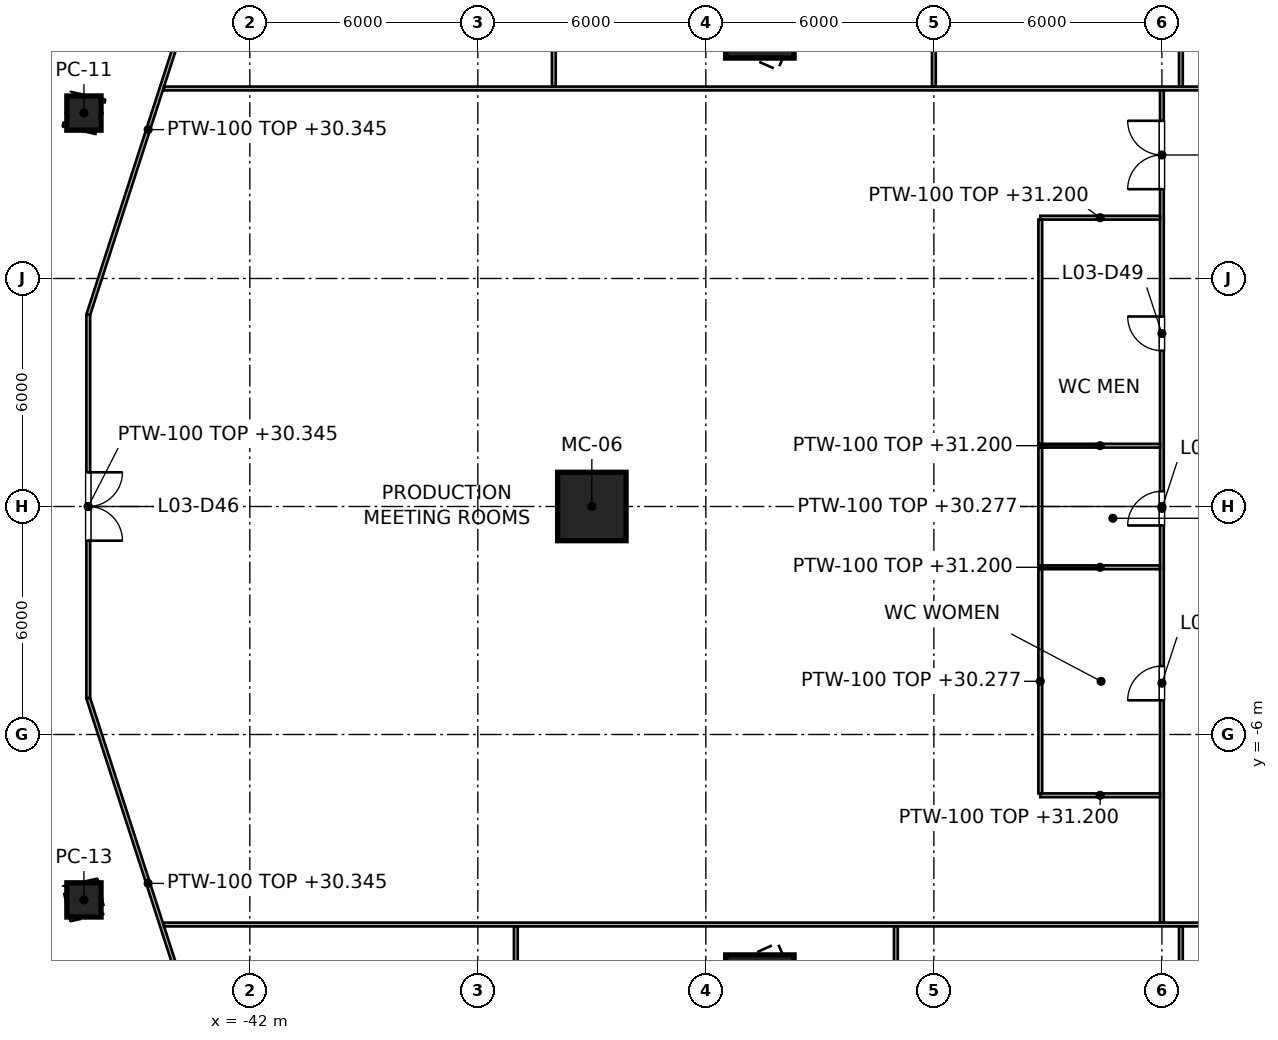
"""IFC4 building model, lengths in metres.
Left out: names, types, materials, properties, quantities, classifications, styles, units other than length and angle.
Written with IfcOpenShell. Run it as: python <this file> out.ifc"""

import sys

from ifc_helpers import new_model, si_unit, direction, frame, frame_2d, origin, origin_2d, place, context, subcontext, project, spatial, rectangle, hollow_rectangle, extrude, element, fill, save


model = new_model("IFC4")
c1 = context("Model", 3, precision=1e-05, world=origin(), true_north=direction((0.0, 1.0)))
c2 = subcontext(c1, "Body", "Model", "MODEL_VIEW")
j1 = project(units=[si_unit("LENGTHUNIT", "METRE"), si_unit("PLANEANGLEUNIT", "RADIAN")], contexts=[c1])
p1 = place(None, origin())
s1 = spatial("IfcSite", under=j1, at=p1, CompositionType="ELEMENT")
p2 = place(p1, origin())
s2 = spatial("IfcBuilding", under=s1, at=p2, CompositionType="ELEMENT")
p3 = place(p2, frame((0.0, 0.0, 26.0)))
s3 = spatial("IfcBuildingStorey", under=s2, at=p3, CompositionType="ELEMENT", Elevation=26.0)
for number, where, z_axis, x_axis in (
    (1, (-28.579, 12.7, 0.0), (0.0, 0.0, 1.0), (-0.914, 0.406, 0.0)),
    (2, (-33.0, 0.0, 0.0), (0.0, 0.0, 1.0), (-1.0, 0.0, 0.0)),
    (3, (-28.579, -12.7, 0.0), (0.0, 0.0, 1.0), (-0.914, -0.406, 0.0)),
):
    element("IfcColumn", number, at=place(p3, frame(where, z_axis=z_axis, x_axis=x_axis)), inside=s3, PredefinedType="COLUMN", context=c2, shape_type="SweptSolid", body=[
        extrude(hollow_rectangle(XDim=1.8, YDim=1.8, WallThickness=0.08, at=origin_2d()), origin(), (0.0, 0.0, 1.0), 5.4),
    ])
for number, where, z_axis, x_axis in (
    (4, (-46.365, 10.353, 0.0), (0.0, 0.0, 1.0), (-0.976, 0.218, 0.0)),
    (5, (-46.365, -10.353, 0.0), (0.0, 0.0, 1.0), (-0.976, -0.218, 0.0)),
):
    element("IfcColumn", number, at=place(p3, frame(where, z_axis=z_axis, x_axis=x_axis)), inside=s3, PredefinedType="COLUMN", context=c2, shape_type="SweptSolid", body=[
        extrude(hollow_rectangle(XDim=0.9, YDim=0.9, WallThickness=0.04, at=origin_2d()), origin(), (0.0, 0.0, 1.0), 5.4),
    ])
p4 = place(p3, frame((-43.099, 14.791, 0.0), z_axis=(0.0, 0.0, 1.0), x_axis=(-0.307713034182, -0.951479210805, 0.0)))
e6 = element("IfcWall", 6, at=p4, inside=s3, PredefinedType="PARTITIONING", context=c2, shape_type="SweptSolid", body=[
    extrude(rectangle(XDim=10.243, YDim=0.1, at=frame_2d((5.122, 0.0))), origin(), (0.0, 0.0, 1.0), 4.345),
])
p5 = place(p3, frame((-46.251, 5.045, 0.0), z_axis=(0.0, 0.0, 1.0), x_axis=(0.0, -1.0, 0.0)))
e7 = element("IfcWall", 7, at=p5, inside=s3, PredefinedType="PARTITIONING", context=c2, shape_type="SweptSolid", body=[
    extrude(rectangle(XDim=10.09, YDim=0.1, at=frame_2d((5.045, 0.0))), origin(), (0.0, 0.0, 1.0), 4.345),
])
p6 = place(p5, frame((4.145, 0.0, 0.0)))
e8 = element("IfcOpeningElement", 8, at=p6, cuts=e7, PredefinedType="OPENING", context=c2, shape_type="SweptSolid", body=[
    extrude(rectangle(XDim=1.8, YDim=2.1, at=frame_2d((0.9, 1.05))), frame((0.0, 0.05, 0.0), z_axis=(0.0, -1.0, 0.0), x_axis=(1.0, 0.0, 0.0)), (0.0, 0.0, 1.0), 0.1),
])
p7 = place(p3, frame((-46.251, -5.045, 0.0), z_axis=(0.0, 0.0, 1.0), x_axis=(0.307713034182, -0.951479210805, 0.0)))
e9 = element("IfcWall", 9, at=p7, inside=s3, PredefinedType="PARTITIONING", context=c2, shape_type="SweptSolid", body=[
    extrude(rectangle(XDim=10.243, YDim=0.1, at=frame_2d((5.122, 0.0))), origin(), (0.0, 0.0, 1.0), 4.345),
])
p8 = place(p3, frame((-44.256, 11.0, 0.0), z_axis=(0.0, 0.0, 1.0), x_axis=(1.0, 0.0, 0.0)))
e10 = element("IfcWall", 10, at=p8, inside=s3, PredefinedType="PARTITIONING", context=c2, shape_type="SweptSolid", body=[
    extrude(rectangle(XDim=88.512, YDim=0.1, at=frame_2d((44.256, 0.0))), origin(), (0.0, 0.0, 1.0), 4.268),
])
p9 = place(p8, frame((54.2, 0.0, 0.0)))
e11 = element("IfcOpeningElement", 11, at=p9, cuts=e10, PredefinedType="OPENING", context=c2, shape_type="SweptSolid", body=[
    extrude(rectangle(XDim=1.4, YDim=2.1, at=frame_2d((0.7, 1.05))), frame((0.0, 0.05, 0.0), z_axis=(0.0, -1.0, 0.0), x_axis=(1.0, 0.0, 0.0)), (0.0, 0.0, 1.0), 0.1),
])
p10 = place(p8, frame((32.9, 0.0, 0.0)))
e12 = element("IfcOpeningElement", 12, at=p10, cuts=e10, PredefinedType="OPENING", context=c2, shape_type="SweptSolid", body=[
    extrude(rectangle(XDim=1.4, YDim=2.1, at=frame_2d((0.7, 1.05))), frame((0.0, 0.05, 0.0), z_axis=(0.0, -1.0, 0.0), x_axis=(1.0, 0.0, 0.0)), (0.0, 0.0, 1.0), 0.1),
])
p11 = place(p8, frame((29.15, 0.0, 0.0)))
e13 = element("IfcOpeningElement", 13, at=p11, cuts=e10, PredefinedType="OPENING", context=c2, shape_type="SweptSolid", body=[
    extrude(rectangle(XDim=0.9, YDim=2.1, at=frame_2d((0.45, 1.05))), frame((0.0, 0.05, 0.0), z_axis=(0.0, -1.0, 0.0), x_axis=(1.0, 0.0, 0.0)), (0.0, 0.0, 1.0), 0.1),
])
p12 = place(p8, frame((46.55, 0.0, 0.0)))
e14 = element("IfcOpeningElement", 14, at=p12, cuts=e10, PredefinedType="OPENING", context=c2, shape_type="SweptSolid", body=[
    extrude(rectangle(XDim=0.9, YDim=2.1, at=frame_2d((0.45, 1.05))), frame((0.0, 0.05, 0.0), z_axis=(0.0, -1.0, 0.0), x_axis=(1.0, 0.0, 0.0)), (0.0, 0.0, 1.0), 0.1),
])
p13 = place(p8, frame((60.85, 0.0, 0.0)))
e15 = element("IfcOpeningElement", 15, at=p13, cuts=e10, PredefinedType="OPENING", context=c2, shape_type="SweptSolid", body=[
    extrude(rectangle(XDim=0.9, YDim=2.1, at=frame_2d((0.45, 1.05))), frame((0.0, 0.05, 0.0), z_axis=(0.0, -1.0, 0.0), x_axis=(1.0, 0.0, 0.0)), (0.0, 0.0, 1.0), 0.1),
])
p14 = place(p3, frame((-44.256, -11.0, 0.0), z_axis=(0.0, 0.0, 1.0), x_axis=(1.0, 0.0, 0.0)))
e16 = element("IfcWall", 16, at=p14, inside=s3, PredefinedType="PARTITIONING", context=c2, shape_type="SweptSolid", body=[
    extrude(rectangle(XDim=88.512, YDim=0.1, at=frame_2d((44.256, 0.0))), origin(), (0.0, 0.0, 1.0), 4.268),
])
p15 = place(p14, frame((32.9, 0.0, 0.0)))
e17 = element("IfcOpeningElement", 17, at=p15, cuts=e16, PredefinedType="OPENING", context=c2, shape_type="SweptSolid", body=[
    extrude(rectangle(XDim=1.4, YDim=2.1, at=frame_2d((0.7, 1.05))), frame((0.0, 0.05, 0.0), z_axis=(0.0, -1.0, 0.0), x_axis=(1.0, 0.0, 0.0)), (0.0, 0.0, 1.0), 0.1),
])
p16 = place(p14, frame((54.2, 0.0, 0.0)))
e18 = element("IfcOpeningElement", 18, at=p16, cuts=e16, PredefinedType="OPENING", context=c2, shape_type="SweptSolid", body=[
    extrude(rectangle(XDim=1.4, YDim=2.1, at=frame_2d((0.7, 1.05))), frame((0.0, 0.05, 0.0), z_axis=(0.0, -1.0, 0.0), x_axis=(1.0, 0.0, 0.0)), (0.0, 0.0, 1.0), 0.1),
])
p17 = place(p14, frame((37.85, 0.0, 0.0)))
e19 = element("IfcOpeningElement", 19, at=p17, cuts=e16, PredefinedType="OPENING", context=c2, shape_type="SweptSolid", body=[
    extrude(rectangle(XDim=0.9, YDim=2.1, at=frame_2d((0.45, 1.05))), frame((0.0, 0.05, 0.0), z_axis=(0.0, -1.0, 0.0), x_axis=(1.0, 0.0, 0.0)), (0.0, 0.0, 1.0), 0.1),
])
p18 = place(p14, frame((47.3, 0.0, 0.0)))
e20 = element("IfcOpeningElement", 20, at=p18, cuts=e16, PredefinedType="OPENING", context=c2, shape_type="SweptSolid", body=[
    extrude(rectangle(XDim=0.9, YDim=2.1, at=frame_2d((0.45, 1.05))), frame((0.0, 0.05, 0.0), z_axis=(0.0, -1.0, 0.0), x_axis=(1.0, 0.0, 0.0)), (0.0, 0.0, 1.0), 0.1),
])
p19 = place(p3, frame((-18.0, -10.95, 0.0), z_axis=(0.0, 0.0, 1.0), x_axis=(0.0, 1.0, 0.0)))
e21 = element("IfcWall", 21, at=p19, inside=s3, PredefinedType="PARTITIONING", context=c2, shape_type="SweptSolid", body=[
    extrude(rectangle(XDim=21.9, YDim=0.1, at=frame_2d((10.95, 0.0))), origin(), (0.0, 0.0, 1.0), 4.277),
])
p20 = place(p19, frame((19.3, 0.0, 0.0)))
e22 = element("IfcOpeningElement", 22, at=p20, cuts=e21, PredefinedType="OPENING", context=c2, shape_type="SweptSolid", body=[
    extrude(rectangle(XDim=1.8, YDim=2.1, at=frame_2d((0.9, 1.05))), frame((0.0, 0.05, 0.0), z_axis=(0.0, -1.0, 0.0), x_axis=(1.0, 0.0, 0.0)), (0.0, 0.0, 1.0), 0.1),
])
p21 = place(p19, frame((5.85, 0.0, 0.0)))
e23 = element("IfcOpeningElement", 23, at=p21, cuts=e21, PredefinedType="OPENING", context=c2, shape_type="SweptSolid", body=[
    extrude(rectangle(XDim=0.9, YDim=2.1, at=frame_2d((0.45, 1.05))), frame((0.0, 0.05, 0.0), z_axis=(0.0, -1.0, 0.0), x_axis=(1.0, 0.0, 0.0)), (0.0, 0.0, 1.0), 0.1),
])
p22 = place(p19, frame((10.45, 0.0, 0.0)))
e24 = element("IfcOpeningElement", 24, at=p22, cuts=e21, PredefinedType="OPENING", context=c2, shape_type="SweptSolid", body=[
    extrude(rectangle(XDim=0.9, YDim=2.1, at=frame_2d((0.45, 1.05))), frame((0.0, 0.05, 0.0), z_axis=(0.0, -1.0, 0.0), x_axis=(1.0, 0.0, 0.0)), (0.0, 0.0, 1.0), 0.1),
])
p23 = place(p19, frame((15.05, 0.0, 0.0)))
e25 = element("IfcOpeningElement", 25, at=p23, cuts=e21, PredefinedType="OPENING", context=c2, shape_type="SweptSolid", body=[
    extrude(rectangle(XDim=0.9, YDim=2.1, at=frame_2d((0.45, 1.05))), frame((0.0, 0.05, 0.0), z_axis=(0.0, -1.0, 0.0), x_axis=(1.0, 0.0, 0.0)), (0.0, 0.0, 1.0), 0.1),
])
p24 = place(p3, frame((-34.0, 11.05, 0.0), z_axis=(0.0, 0.0, 1.0), x_axis=(0.0, 1.0, 0.0)))
e26 = element("IfcWall", 26, at=p24, inside=s3, PredefinedType="PARTITIONING", context=c2, shape_type="SweptSolid", body=[
    extrude(rectangle(XDim=14.866, YDim=0.1, at=frame_2d((7.433, 0.0))), origin(), (0.0, 0.0, 1.0), 4.345),
])
p25 = place(p3, frame((-24.0, 11.05, 0.0), z_axis=(0.0, 0.0, 1.0), x_axis=(0.0, 1.0, 0.0)))
e27 = element("IfcWall", 27, at=p25, inside=s3, PredefinedType="PARTITIONING", context=c2, shape_type="SweptSolid", body=[
    extrude(rectangle(XDim=21.638, YDim=0.1, at=frame_2d((10.819, 0.0))), origin(), (0.0, 0.0, 1.0), 4.268),
])
p26 = place(p3, frame((-17.5, 11.05, 0.0), z_axis=(0.0, 0.0, 1.0), x_axis=(0.0, 1.0, 0.0)))
e28 = element("IfcWall", 28, at=p26, inside=s3, PredefinedType="PARTITIONING", context=c2, shape_type="SweptSolid", body=[
    extrude(rectangle(XDim=24.674, YDim=0.1, at=frame_2d((12.337, 0.0))), origin(), (0.0, 0.0, 1.0), 4.268),
])
p27 = place(p3, frame((-35.0, -11.05, 0.0), z_axis=(0.0, 0.0, 1.0), x_axis=(0.0, -1.0, 0.0)))
e29 = element("IfcWall", 29, at=p27, inside=s3, PredefinedType="PARTITIONING", context=c2, shape_type="SweptSolid", body=[
    extrude(rectangle(XDim=14.037, YDim=0.1, at=frame_2d((7.019, 0.0))), origin(), (0.0, 0.0, 1.0), 4.345),
])
p28 = place(p3, frame((-25.0, -11.05, 0.0), z_axis=(0.0, 0.0, 1.0), x_axis=(0.0, -1.0, 0.0)))
e30 = element("IfcWall", 30, at=p28, inside=s3, PredefinedType="PARTITIONING", context=c2, shape_type="SweptSolid", body=[
    extrude(rectangle(XDim=21.159, YDim=0.1, at=frame_2d((10.58, 0.0))), origin(), (0.0, 0.0, 1.0), 4.268),
])
p29 = place(p3, frame((-17.5, -11.05, 0.0), z_axis=(0.0, 0.0, 1.0), x_axis=(0.0, -1.0, 0.0)))
e31 = element("IfcWall", 31, at=p29, inside=s3, PredefinedType="PARTITIONING", context=c2, shape_type="SweptSolid", body=[
    extrude(rectangle(XDim=24.674, YDim=0.1, at=frame_2d((12.337, 0.0))), origin(), (0.0, 0.0, 1.0), 4.268),
])
for number, where, z_axis, x_axis in (
    (32, (-21.2, -7.6, 0.0), (0.0, 0.0, 1.0), (1.0, 0.0, 0.0)),
    (33, (-18.05, -1.6, 0.0), (0.0, 0.0, 1.0), (-1.0, 0.0, 0.0)),
):
    element("IfcWall", number, at=place(p3, frame(where, z_axis=z_axis, x_axis=x_axis)), inside=s3, PredefinedType="PARTITIONING", context=c2, shape_type="SweptSolid", body=[
        extrude(rectangle(XDim=3.15, YDim=0.1, at=frame_2d((1.575, 0.0))), origin(), (0.0, 0.0, 1.0), 5.2),
    ])
p30 = place(p3, frame((-21.2, -1.65, 0.0), z_axis=(0.0, 0.0, 1.0), x_axis=(0.0, -1.0, 0.0)))
e34 = element("IfcWall", 34, at=p30, inside=s3, PredefinedType="PARTITIONING", context=c2, shape_type="SweptSolid", body=[
    extrude(rectangle(XDim=5.9, YDim=0.1, at=frame_2d((2.95, 0.0))), origin(), (0.0, 0.0, 1.0), 4.277),
])
p31 = place(p3, frame((-18.05, 1.6, 0.0), z_axis=(0.0, 0.0, 1.0), x_axis=(-1.0, 0.0, 0.0)))
e35 = element("IfcWall", 35, at=p31, inside=s3, PredefinedType="PARTITIONING", context=c2, shape_type="SweptSolid", body=[
    extrude(rectangle(XDim=3.15, YDim=0.1, at=frame_2d((1.575, 0.0))), origin(), (0.0, 0.0, 1.0), 5.2),
])
p32 = place(p3, frame((-21.2, 1.55, 0.0), z_axis=(0.0, 0.0, 1.0), x_axis=(0.0, -1.0, 0.0)))
e36 = element("IfcWall", 36, at=p32, inside=s3, PredefinedType="PARTITIONING", context=c2, shape_type="SweptSolid", body=[
    extrude(rectangle(XDim=3.1, YDim=0.1, at=frame_2d((1.55, 0.0))), origin(), (0.0, 0.0, 1.0), 4.277),
])
p33 = place(p3, frame((-18.05, 7.6, 0.0), z_axis=(0.0, 0.0, 1.0), x_axis=(-1.0, 0.0, 0.0)))
e37 = element("IfcWall", 37, at=p33, inside=s3, PredefinedType="PARTITIONING", context=c2, shape_type="SweptSolid", body=[
    extrude(rectangle(XDim=3.15, YDim=0.1, at=frame_2d((1.575, 0.0))), origin(), (0.0, 0.0, 1.0), 5.2),
])
p34 = place(p3, frame((-21.2, 7.55, 0.0), z_axis=(0.0, 0.0, 1.0), x_axis=(0.0, -1.0, 0.0)))
e38 = element("IfcWall", 38, at=p34, inside=s3, PredefinedType="PARTITIONING", context=c2, shape_type="SweptSolid", body=[
    extrude(rectangle(XDim=5.9, YDim=0.1, at=frame_2d((2.95, 0.0))), origin(), (0.0, 0.0, 1.0), 4.277),
])
p35 = place(p20, origin())
e39 = element("IfcDoor", 39, at=p35, inside=s3, OperationType="DOUBLE_DOOR_SINGLE_SWING", PredefinedType="DOOR", context=c2, shape_type="SweptSolid", body=[
    extrude(rectangle(XDim=1.8, YDim=2.1, at=frame_2d((0.9, 1.05))), frame((0.0, 0.025, 0.0), z_axis=(0.0, -1.0, 0.0), x_axis=(1.0, 0.0, 0.0)), (0.0, 0.0, 1.0), 0.05),
])
fill(e22, e39)
p36 = place(p6, origin())
e40 = element("IfcDoor", 40, at=p36, inside=s3, OperationType="DOUBLE_DOOR_SINGLE_SWING", PredefinedType="DOOR", context=c2, shape_type="SweptSolid", body=[
    extrude(rectangle(XDim=1.8, YDim=2.1, at=frame_2d((0.9, 1.05))), frame((0.0, 0.025, 0.0), z_axis=(0.0, -1.0, 0.0), x_axis=(1.0, 0.0, 0.0)), (0.0, 0.0, 1.0), 0.05),
])
fill(e8, e40)
p37 = place(p21, origin())
e41 = element("IfcDoor", 41, at=p37, inside=s3, OperationType="SINGLE_SWING_LEFT", PredefinedType="DOOR", context=c2, shape_type="SweptSolid", body=[
    extrude(rectangle(XDim=0.9, YDim=2.1, at=frame_2d((0.45, 1.05))), frame((0.0, 0.025, 0.0), z_axis=(0.0, -1.0, 0.0), x_axis=(1.0, 0.0, 0.0)), (0.0, 0.0, 1.0), 0.05),
])
fill(e23, e41)
p38 = place(p22, origin())
e42 = element("IfcDoor", 42, at=p38, inside=s3, OperationType="SINGLE_SWING_LEFT", PredefinedType="DOOR", context=c2, shape_type="SweptSolid", body=[
    extrude(rectangle(XDim=0.9, YDim=2.1, at=frame_2d((0.45, 1.05))), frame((0.0, 0.025, 0.0), z_axis=(0.0, -1.0, 0.0), x_axis=(1.0, 0.0, 0.0)), (0.0, 0.0, 1.0), 0.05),
])
fill(e24, e42)
p39 = place(p23, origin())
e43 = element("IfcDoor", 43, at=p39, inside=s3, OperationType="SINGLE_SWING_RIGHT", PredefinedType="DOOR", context=c2, shape_type="SweptSolid", body=[
    extrude(rectangle(XDim=0.9, YDim=2.1, at=frame_2d((0.45, 1.05))), frame((0.0, 0.025, 0.0), z_axis=(0.0, -1.0, 0.0), x_axis=(1.0, 0.0, 0.0)), (0.0, 0.0, 1.0), 0.05),
])
fill(e25, e43)
save(model, sys.argv[1])
